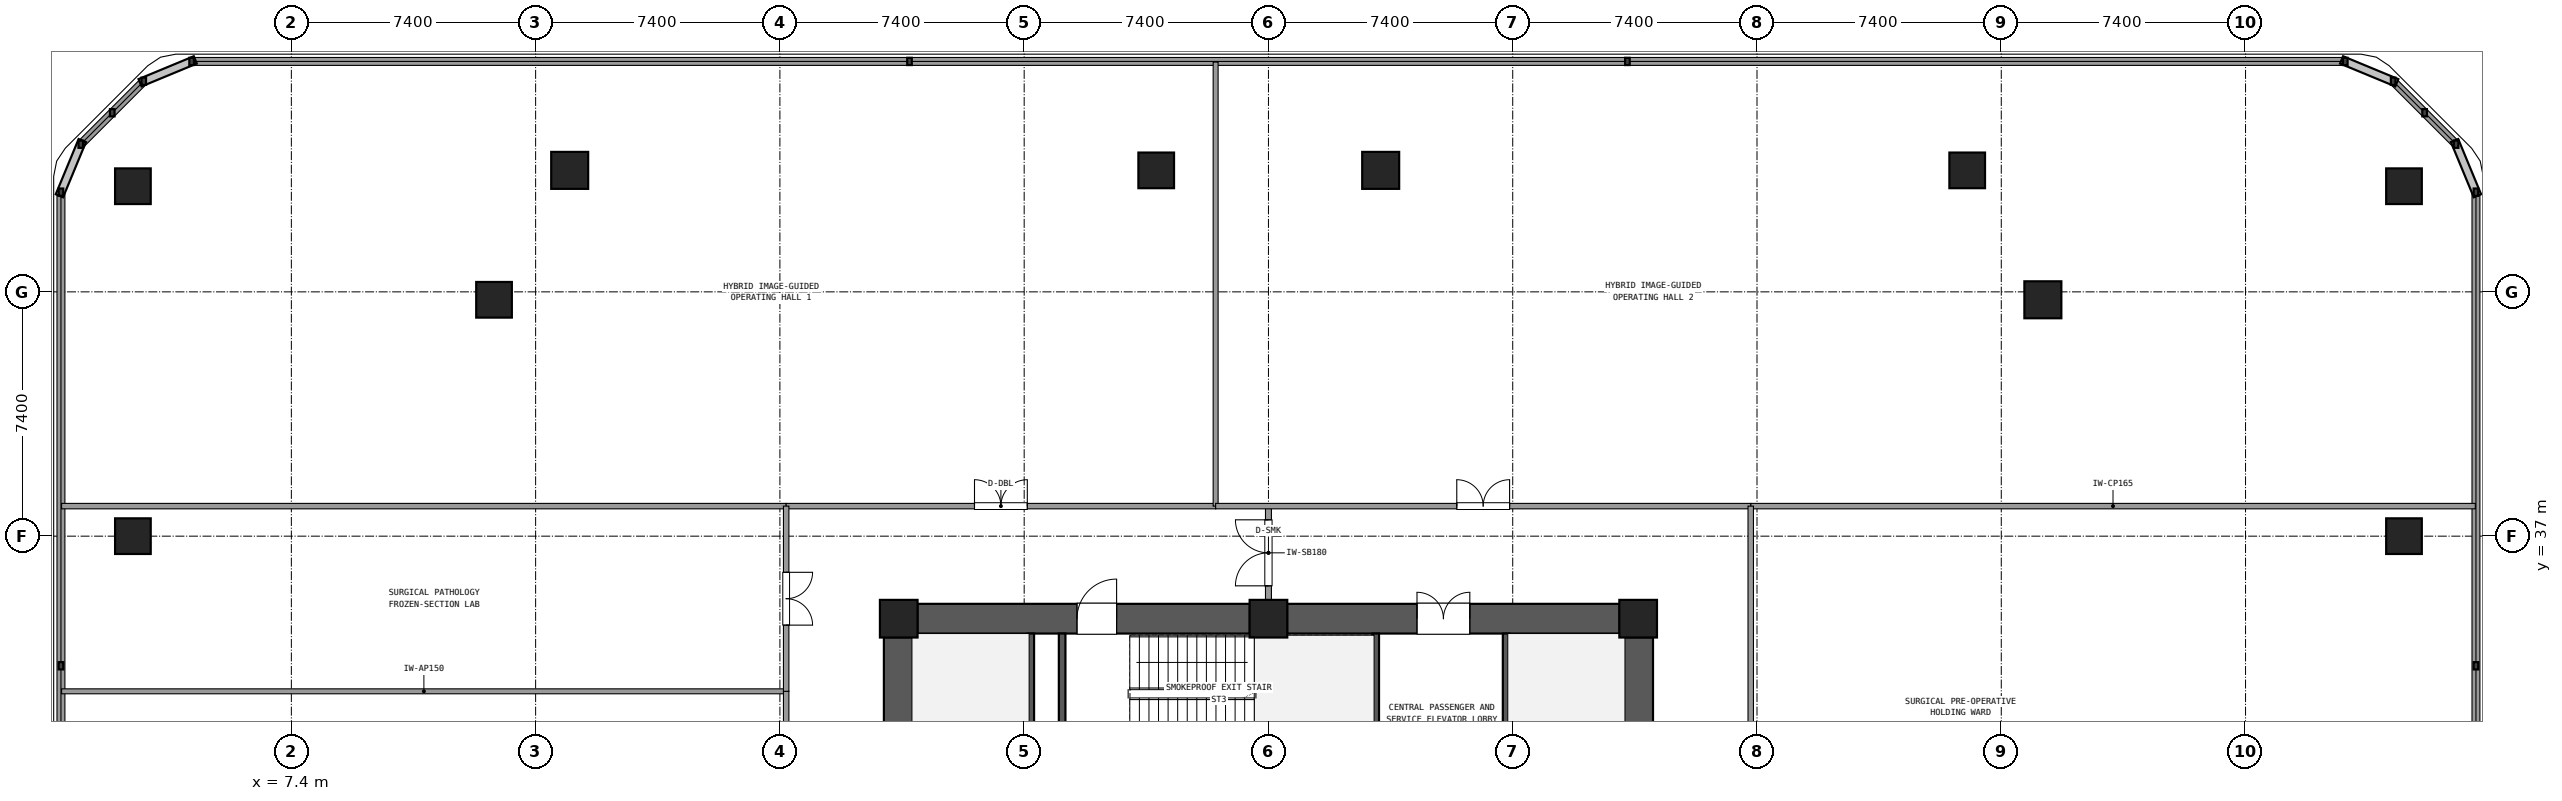
"""IFC4 building model, lengths in metres.
Left out: names, types, materials, properties, quantities, classifications, styles, units other than length and angle.
Written with IfcOpenShell. Run it as: python <this file> out.ifc"""

import sys

from ifc_helpers import new_model, si_unit, direction, frame, frame_2d, origin, origin_2d, place, context, subcontext, project, spatial, rectangle, circle, extrude, element, fill, save


model = new_model("IFC4")
c1 = context("Model", 3, precision=1e-05, world=origin(), true_north=direction((0.0, 1.0)))
c2 = subcontext(c1, "Body", "Model", "MODEL_VIEW")
j1 = project(units=[si_unit("LENGTHUNIT", "METRE"), si_unit("PLANEANGLEUNIT", "RADIAN")], contexts=[c1])
p1 = place(None, origin())
s1 = spatial("IfcSite", under=j1, at=p1, CompositionType="ELEMENT")
p2 = place(p1, origin())
s2 = spatial("IfcBuilding", under=s1, at=p2, CompositionType="ELEMENT")
p3 = place(p2, frame((0.0, 0.0, 18.9)))
s3 = spatial("IfcBuildingStorey", under=s2, at=p3, CompositionType="ELEMENT", Elevation=18.9)
for number, where, z_axis, x_axis in (
    (1, (48.2, 34.5, 0.0), (0.0, 0.0, 1.0), (1.0, 0.0, 0.0)),
    (2, (37.0, 34.5, 0.0), (0.0, 0.0, 1.0), (1.0, 0.0, 0.0)),
    (3, (25.8, 34.5, 0.0), (0.0, 0.0, 1.0), (1.0, 0.0, 0.0)),
):
    element("IfcColumn", number, at=place(p3, frame(where, z_axis=z_axis, x_axis=x_axis)), inside=s3, PredefinedType="COLUMN", context=c2, shape_type="SweptSolid", body=[
        extrude(rectangle(XDim=1.14, YDim=1.14, at=origin_2d()), origin(), (0.0, 0.0, 1.0), 5.04),
    ])
p4 = place(p3, frame((48.2, 26.465, 0.0), z_axis=(0.0, 0.0, 1.0), x_axis=(0.0, 1.0, 0.0)))
e4 = element("IfcWall", 4, at=p4, inside=s3, PredefinedType="SHEAR", context=c2, shape_type="SweptSolid", body=[
    extrude(rectangle(XDim=7.47, YDim=0.9, at=frame_2d((3.735, 0.0))), origin(), (0.0, 0.0, 1.0), 4.76),
])
p5 = place(p3, frame((47.635, 34.5, 0.0), z_axis=(0.0, 0.0, 1.0), x_axis=(-1.0, 0.0, 0.0)))
e5 = element("IfcWall", 5, at=p5, inside=s3, PredefinedType="SHEAR", context=c2, shape_type="SweptSolid", body=[
    extrude(rectangle(XDim=10.07, YDim=0.9, at=frame_2d((5.035, 0.0))), origin(), (0.0, 0.0, 1.0), 4.76),
])
p6 = place(p5, frame((4.535, 0.0, 0.0)))
e6 = element("IfcOpeningElement", 6, at=p6, cuts=e5, PredefinedType="OPENING", context=c2, shape_type="SweptSolid", body=[
    extrude(rectangle(XDim=1.6, YDim=2.2, at=frame_2d((0.8, 1.1))), frame((0.0, 0.46, 0.0), z_axis=(0.0, -1.0, 0.0), x_axis=(1.0, 0.0, 0.0)), (0.0, 0.0, 1.0), 0.92),
])
p7 = place(p3, frame((36.435, 34.5, 0.0), z_axis=(0.0, 0.0, 1.0), x_axis=(-1.0, 0.0, 0.0)))
e7 = element("IfcWall", 7, at=p7, inside=s3, PredefinedType="SHEAR", context=c2, shape_type="SweptSolid", body=[
    extrude(rectangle(XDim=10.07, YDim=0.9, at=frame_2d((5.035, 0.0))), origin(), (0.0, 0.0, 1.0), 4.76),
])
p8 = place(p7, frame((4.035, 0.0, 0.0)))
e8 = element("IfcOpeningElement", 8, at=p8, cuts=e7, PredefinedType="OPENING", context=c2, shape_type="SweptSolid", body=[
    extrude(rectangle(XDim=1.2, YDim=2.15, at=frame_2d((0.6, 1.075))), frame((0.0, 0.46, 0.0), z_axis=(0.0, -1.0, 0.0), x_axis=(1.0, 0.0, 0.0)), (0.0, 0.0, 1.0), 0.92),
])
p9 = place(p3, frame((25.8, 33.935, 0.0), z_axis=(0.0, 0.0, 1.0), x_axis=(0.0, -1.0, 0.0)))
e9 = element("IfcWall", 9, at=p9, inside=s3, PredefinedType="SHEAR", context=c2, shape_type="SweptSolid", body=[
    extrude(rectangle(XDim=7.47, YDim=0.9, at=frame_2d((3.735, 0.0))), origin(), (0.0, 0.0, 1.0), 4.76),
])
p10 = place(p3, frame((60.46, 44.16, 0.0), z_axis=(0.0, 0.0, 1.0), x_axis=(1.0, 0.0, 0.0)))
e10 = element("IfcColumn", 10, at=p10, inside=s3, PredefinedType="COLUMN", context=c2, shape_type="SweptSolid", body=[
    extrude(circle(Radius=0.56, at=origin_2d()), origin(), (0.0, 0.0, 1.0), 5.04),
])
p11 = place(p3, frame((58.168, 48.08, 0.0), z_axis=(0.0, 0.0, 1.0), x_axis=(1.0, 0.0, 0.0)))
e11 = element("IfcColumn", 11, at=p11, inside=s3, PredefinedType="COLUMN", context=c2, shape_type="SweptSolid", body=[
    extrude(rectangle(XDim=1.08, YDim=1.08, at=origin_2d()), origin(), (0.0, 0.0, 1.0), 5.04),
])
p12 = place(p3, frame((40.4, 48.08, 0.0), z_axis=(0.0, 0.0, 1.0), x_axis=(1.0, 0.0, 0.0)))
e12 = element("IfcColumn", 12, at=p12, inside=s3, PredefinedType="COLUMN", context=c2, shape_type="SweptSolid", body=[
    extrude(circle(Radius=0.56, at=origin_2d()), origin(), (0.0, 0.0, 1.0), 5.04),
])
p13 = place(p3, frame((33.6, 48.08, 0.0), z_axis=(0.0, 0.0, 1.0), x_axis=(1.0, 0.0, 0.0)))
e13 = element("IfcColumn", 13, at=p13, inside=s3, PredefinedType="COLUMN", context=c2, shape_type="SweptSolid", body=[
    extrude(rectangle(XDim=1.08, YDim=1.08, at=origin_2d()), origin(), (0.0, 0.0, 1.0), 5.04),
])
p14 = place(p3, frame((15.832, 48.08, 0.0), z_axis=(0.0, 0.0, 1.0), x_axis=(1.0, 0.0, 0.0)))
e14 = element("IfcColumn", 14, at=p14, inside=s3, PredefinedType="COLUMN", context=c2, shape_type="SweptSolid", body=[
    extrude(circle(Radius=0.56, at=origin_2d()), origin(), (0.0, 0.0, 1.0), 5.04),
])
for number, where, z_axis, x_axis in (
    (15, (13.54, 44.16, 0.0), (0.0, 0.0, 1.0), (1.0, 0.0, 0.0)),
    (16, (2.6, 37.0, 0.0), (0.0, 0.0, 1.0), (1.0, 0.0, 0.0)),
    (17, (2.6, 47.6, 0.0), (0.0, 0.0, 1.0), (1.0, 0.0, 0.0)),
    (18, (71.4, 37.0, 0.0), (0.0, 0.0, 1.0), (1.0, 0.0, 0.0)),
    (19, (71.4, 47.6, 0.0), (0.0, 0.0, 1.0), (1.0, 0.0, 0.0)),
):
    element("IfcColumn", number, at=place(p3, frame(where, z_axis=z_axis, x_axis=x_axis)), inside=s3, PredefinedType="COLUMN", context=c2, shape_type="SweptSolid", body=[
        extrude(rectangle(XDim=1.08, YDim=1.08, at=origin_2d()), origin(), (0.0, 0.0, 1.0), 5.04),
    ])
p15 = place(p3, frame((73.58, 4.379, 0.0), z_axis=(0.0, 0.0, 1.0), x_axis=(0.0, 1.0, 0.0)))
e20 = element("IfcWall", 20, at=p15, inside=s3, PredefinedType="SOLIDWALL", context=c2, shape_type="SweptSolid", body=[
    extrude(rectangle(XDim=43.042, YDim=0.24, at=frame_2d((21.521, 0.0))), origin(), (0.0, 0.0, 1.0), 0.85),
])
p16 = place(p3, frame((72.979, 48.872, 0.0), z_axis=(0.0, 0.0, 1.0), x_axis=(-0.707106781187, 0.707106781187, 0.0)))
e21 = element("IfcWall", 21, at=p16, inside=s3, PredefinedType="SOLIDWALL", context=c2, shape_type="SweptSolid", body=[
    extrude(rectangle(XDim=2.697, YDim=0.24, at=frame_2d((1.348, 0.0))), origin(), (0.0, 0.0, 1.0), 0.85),
])
p17 = place(p3, frame((69.621, 51.38, 0.0), z_axis=(0.0, 0.0, 1.0), x_axis=(-1.0, 0.0, 0.0)))
e22 = element("IfcWall", 22, at=p17, inside=s3, PredefinedType="SOLIDWALL", context=c2, shape_type="SweptSolid", body=[
    extrude(rectangle(XDim=65.242, YDim=0.24, at=frame_2d((32.621, 0.0))), origin(), (0.0, 0.0, 1.0), 0.85),
])
p18 = place(p3, frame((2.928, 50.779, 0.0), z_axis=(0.0, 0.0, 1.0), x_axis=(-0.707106781187, -0.707106781187, 0.0)))
e23 = element("IfcWall", 23, at=p18, inside=s3, PredefinedType="SOLIDWALL", context=c2, shape_type="SweptSolid", body=[
    extrude(rectangle(XDim=2.697, YDim=0.24, at=frame_2d((1.348, 0.0))), origin(), (0.0, 0.0, 1.0), 0.85),
])
p19 = place(p3, frame((0.42, 47.421, 0.0), z_axis=(0.0, 0.0, 1.0), x_axis=(0.0, -1.0, 0.0)))
e24 = element("IfcWall", 24, at=p19, inside=s3, PredefinedType="SOLIDWALL", context=c2, shape_type="SweptSolid", body=[
    extrude(rectangle(XDim=43.042, YDim=0.24, at=frame_2d((21.521, 0.0))), origin(), (0.0, 0.0, 1.0), 0.85),
])
for number, where, z_axis, x_axis in (
    (25, (29.8, 24.65, 0.0), (0.0, 0.0, 1.0), (0.0, 1.0, 0.0)),
    (26, (44.2, 24.65, 0.0), (0.0, 0.0, 1.0), (0.0, 1.0, 0.0)),
):
    element("IfcWall", number, at=place(p3, frame(where, z_axis=z_axis, x_axis=x_axis)), inside=s3, PredefinedType="SHEAR", context=c2, shape_type="SweptSolid", body=[
        extrude(rectangle(XDim=9.4, YDim=0.2, at=frame_2d((4.7, 0.0))), origin(), (0.0, 0.0, 1.0), 4.76),
    ])
for number, where, z_axis, x_axis in (
    (27, (30.75, 30.36, 0.0), (0.0, 0.0, 1.0), (0.0, 1.0, 0.0)),
    (28, (40.25, 30.36, 0.0), (0.0, 0.0, 1.0), (0.0, 1.0, 0.0)),
):
    element("IfcWall", number, at=place(p3, frame(where, z_axis=z_axis, x_axis=x_axis)), inside=s3, PredefinedType="SHEAR", context=c2, shape_type="SweptSolid", body=[
        extrude(rectangle(XDim=3.69, YDim=0.2, at=frame_2d((1.845, 0.0))), origin(), (0.0, 0.0, 1.0), 4.76),
    ])
p20 = place(p3, frame((37.0, 35.08, 0.0), z_axis=(0.0, 0.0, 1.0), x_axis=(0.0, 1.0, 0.0)))
e29 = element("IfcWall", 29, at=p20, inside=s3, PredefinedType="PARTITIONING", context=c2, shape_type="SweptSolid", body=[
    extrude(rectangle(XDim=2.83, YDim=0.18, at=frame_2d((1.415, 0.0))), origin(), (0.0, 0.0, 1.0), 3.13),
])
p21 = place(p20, frame((0.415, 0.0, 0.0)))
e30 = element("IfcOpeningElement", 30, at=p21, cuts=e29, PredefinedType="OPENING", context=c2, shape_type="SweptSolid", body=[
    extrude(rectangle(XDim=2.0, YDim=2.2, at=frame_2d((1.0, 1.1))), frame((0.0, 0.1, 0.0), z_axis=(0.0, -1.0, 0.0), x_axis=(1.0, 0.0, 0.0)), (0.0, 0.0, 1.0), 0.2),
])
for number, where, z_axis, x_axis in (
    (31, (0.44, 37.91, 0.0), (0.0, 0.0, 1.0), (1.0, 0.0, 0.0)),
    (32, (51.61, 37.91, 0.0), (0.0, 0.0, 1.0), (1.0, 0.0, 0.0)),
):
    element("IfcWall", number, at=place(p3, frame(where, z_axis=z_axis, x_axis=x_axis)), inside=s3, PredefinedType="PARTITIONING", context=c2, shape_type="SweptSolid", body=[
        extrude(rectangle(XDim=21.95, YDim=0.165, at=frame_2d((10.975, 0.0))), origin(), (0.0, 0.0, 1.0), 3.13),
    ])
p22 = place(p3, frame((22.39, 37.91, 0.0), z_axis=(0.0, 0.0, 1.0), x_axis=(1.0, 0.0, 0.0)))
e33 = element("IfcWall", 33, at=p22, inside=s3, PredefinedType="PARTITIONING", context=c2, shape_type="SweptSolid", body=[
    extrude(rectangle(XDim=13.01, YDim=0.165, at=frame_2d((6.505, 0.0))), origin(), (0.0, 0.0, 1.0), 3.13),
])
p23 = place(p22, frame((5.705, 0.0, 0.0)))
e34 = element("IfcOpeningElement", 34, at=p23, cuts=e33, PredefinedType="OPENING", context=c2, shape_type="SweptSolid", body=[
    extrude(rectangle(XDim=1.6, YDim=2.2, at=frame_2d((0.8, 1.1))), frame((0.0, 0.093, 0.0), z_axis=(0.0, -1.0, 0.0), x_axis=(1.0, 0.0, 0.0)), (0.0, 0.0, 1.0), 0.185),
])
p24 = place(p3, frame((35.4, 37.91, 0.0), z_axis=(0.0, 0.0, 1.0), x_axis=(0.0, 1.0, 0.0)))
e35 = element("IfcWall", 35, at=p24, inside=s3, PredefinedType="PARTITIONING", context=c2, shape_type="SweptSolid", body=[
    extrude(rectangle(XDim=13.45, YDim=0.15, at=frame_2d((6.725, 0.0))), origin(), (0.0, 0.0, 1.0), 3.13),
])
p25 = place(p3, frame((35.4, 37.91, 0.0), z_axis=(0.0, 0.0, 1.0), x_axis=(1.0, 0.0, 0.0)))
e36 = element("IfcWall", 36, at=p25, inside=s3, PredefinedType="PARTITIONING", context=c2, shape_type="SweptSolid", body=[
    extrude(rectangle(XDim=16.21, YDim=0.165, at=frame_2d((8.105, 0.0))), origin(), (0.0, 0.0, 1.0), 3.13),
])
p26 = place(p25, frame((7.305, 0.0, 0.0)))
e37 = element("IfcOpeningElement", 37, at=p26, cuts=e36, PredefinedType="OPENING", context=c2, shape_type="SweptSolid", body=[
    extrude(rectangle(XDim=1.6, YDim=2.2, at=frame_2d((0.8, 1.1))), frame((0.0, 0.093, 0.0), z_axis=(0.0, -1.0, 0.0), x_axis=(1.0, 0.0, 0.0)), (0.0, 0.0, 1.0), 0.185),
])
p27 = place(p3, frame((22.39, 32.3, 0.0), z_axis=(0.0, 0.0, 1.0), x_axis=(-1.0, 0.0, 0.0)))
e38 = element("IfcWall", 38, at=p27, inside=s3, PredefinedType="PARTITIONING", context=c2, shape_type="SweptSolid", body=[
    extrude(rectangle(XDim=21.95, YDim=0.15, at=frame_2d((10.975, 0.0))), origin(), (0.0, 0.0, 1.0), 3.13),
])
p28 = place(p3, frame((22.39, 26.5, 0.0), z_axis=(0.0, 0.0, 1.0), x_axis=(0.0, 1.0, 0.0)))
e39 = element("IfcWall", 39, at=p28, inside=s3, PredefinedType="PARTITIONING", context=c2, shape_type="SweptSolid", body=[
    extrude(rectangle(XDim=5.8, YDim=0.165, at=frame_2d((2.9, 0.0))), origin(), (0.0, 0.0, 1.0), 3.13),
])
p29 = place(p28, frame((2.1, 0.0, 0.0)))
e40 = element("IfcOpeningElement", 40, at=p29, cuts=e39, PredefinedType="OPENING", context=c2, shape_type="SweptSolid", body=[
    extrude(rectangle(XDim=1.6, YDim=2.2, at=frame_2d((0.8, 1.1))), frame((0.0, 0.093, 0.0), z_axis=(0.0, -1.0, 0.0), x_axis=(1.0, 0.0, 0.0)), (0.0, 0.0, 1.0), 0.185),
])
p30 = place(p3, frame((22.39, 32.3, 0.0), z_axis=(0.0, 0.0, 1.0), x_axis=(0.0, 1.0, 0.0)))
e41 = element("IfcWall", 41, at=p30, inside=s3, PredefinedType="PARTITIONING", context=c2, shape_type="SweptSolid", body=[
    extrude(rectangle(XDim=5.61, YDim=0.165, at=frame_2d((2.805, 0.0))), origin(), (0.0, 0.0, 1.0), 3.13),
])
p31 = place(p30, frame((2.005, 0.0, 0.0)))
e42 = element("IfcOpeningElement", 42, at=p31, cuts=e41, PredefinedType="OPENING", context=c2, shape_type="SweptSolid", body=[
    extrude(rectangle(XDim=1.6, YDim=2.2, at=frame_2d((0.8, 1.1))), frame((0.0, 0.093, 0.0), z_axis=(0.0, -1.0, 0.0), x_axis=(1.0, 0.0, 0.0)), (0.0, 0.0, 1.0), 0.185),
])
p32 = place(p3, frame((51.61, 21.1, 0.0), z_axis=(0.0, 0.0, 1.0), x_axis=(0.0, 1.0, 0.0)))
e43 = element("IfcWall", 43, at=p32, inside=s3, PredefinedType="PARTITIONING", context=c2, shape_type="SweptSolid", body=[
    extrude(rectangle(XDim=16.81, YDim=0.165, at=frame_2d((8.405, 0.0))), origin(), (0.0, 0.0, 1.0), 3.13),
])
p33 = place(p32, frame((7.605, 0.0, 0.0)))
e44 = element("IfcOpeningElement", 44, at=p33, cuts=e43, PredefinedType="OPENING", context=c2, shape_type="SweptSolid", body=[
    extrude(rectangle(XDim=1.6, YDim=2.2, at=frame_2d((0.8, 1.1))), frame((0.0, 0.093, 0.0), z_axis=(0.0, -1.0, 0.0), x_axis=(1.0, 0.0, 0.0)), (0.0, 0.0, 1.0), 0.185),
])
p34 = place(p6, frame((1.6, 0.0, 0.0), z_axis=(0.0, 0.0, 1.0), x_axis=(-1.0, 0.0, 0.0)))
e45 = element("IfcDoor", 45, at=p34, inside=s3, OperationType="DOUBLE_DOOR_SINGLE_SWING", PredefinedType="DOOR", context=c2, shape_type="SweptSolid", body=[
    extrude(rectangle(XDim=1.6, YDim=2.2, at=frame_2d((0.8, 1.1))), frame((0.0, 0.025, 0.0), z_axis=(0.0, -1.0, 0.0), x_axis=(1.0, 0.0, 0.0)), (0.0, 0.0, 1.0), 0.05),
])
fill(e6, e45)
p35 = place(p8, frame((1.2, 0.0, 0.0), z_axis=(0.0, 0.0, 1.0), x_axis=(-1.0, 0.0, 0.0)))
e46 = element("IfcDoor", 46, at=p35, inside=s3, OperationType="SINGLE_SWING_LEFT", PredefinedType="DOOR", context=c2, shape_type="SweptSolid", body=[
    extrude(rectangle(XDim=1.2, YDim=2.15, at=frame_2d((0.6, 1.075))), frame((0.0, 0.025, 0.0), z_axis=(0.0, -1.0, 0.0), x_axis=(1.0, 0.0, 0.0)), (0.0, 0.0, 1.0), 0.05),
])
fill(e8, e46)
p36 = place(p21, origin())
e47 = element("IfcDoor", 47, at=p36, inside=s3, OperationType="DOUBLE_DOOR_SINGLE_SWING", PredefinedType="DOOR", context=c2, shape_type="SweptSolid", body=[
    extrude(rectangle(XDim=2.0, YDim=2.2, at=frame_2d((1.0, 1.1))), frame((0.0, 0.025, 0.0), z_axis=(0.0, -1.0, 0.0), x_axis=(1.0, 0.0, 0.0)), (0.0, 0.0, 1.0), 0.05),
])
fill(e30, e47)
p37 = place(p23, origin())
e48 = element("IfcDoor", 48, at=p37, inside=s3, OperationType="DOUBLE_DOOR_SINGLE_SWING", PredefinedType="DOOR", context=c2, shape_type="SweptSolid", body=[
    extrude(rectangle(XDim=1.6, YDim=2.2, at=frame_2d((0.8, 1.1))), frame((0.0, 0.025, 0.0), z_axis=(0.0, -1.0, 0.0), x_axis=(1.0, 0.0, 0.0)), (0.0, 0.0, 1.0), 0.05),
])
fill(e34, e48)
p38 = place(p26, origin())
e49 = element("IfcDoor", 49, at=p38, inside=s3, OperationType="DOUBLE_DOOR_SINGLE_SWING", PredefinedType="DOOR", context=c2, shape_type="SweptSolid", body=[
    extrude(rectangle(XDim=1.6, YDim=2.2, at=frame_2d((0.8, 1.1))), frame((0.0, 0.025, 0.0), z_axis=(0.0, -1.0, 0.0), x_axis=(1.0, 0.0, 0.0)), (0.0, 0.0, 1.0), 0.05),
])
fill(e37, e49)
p39 = place(p31, frame((1.6, 0.0, 0.0), z_axis=(0.0, 0.0, 1.0), x_axis=(-1.0, 0.0, 0.0)))
e50 = element("IfcDoor", 50, at=p39, inside=s3, OperationType="DOUBLE_DOOR_SINGLE_SWING", PredefinedType="DOOR", context=c2, shape_type="SweptSolid", body=[
    extrude(rectangle(XDim=1.6, YDim=2.2, at=frame_2d((0.8, 1.1))), frame((0.0, 0.025, 0.0), z_axis=(0.0, -1.0, 0.0), x_axis=(1.0, 0.0, 0.0)), (0.0, 0.0, 1.0), 0.05),
])
fill(e42, e50)
save(model, sys.argv[1])
